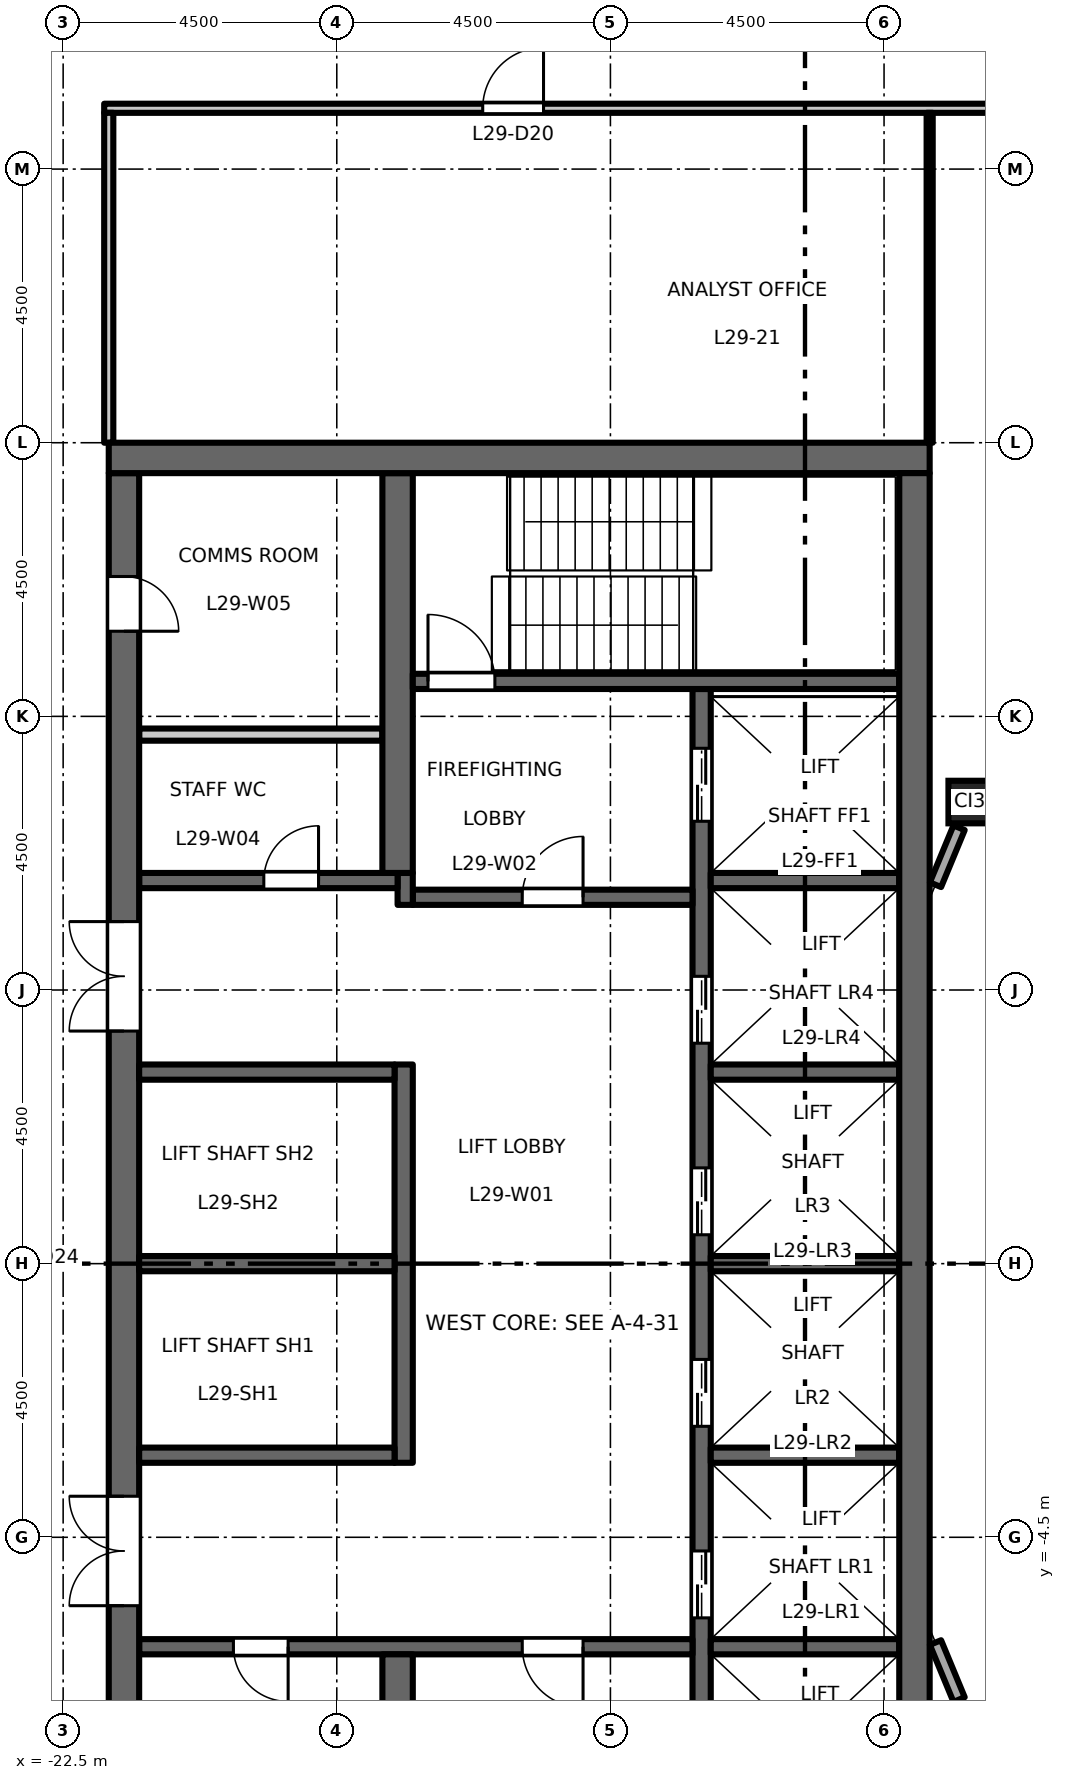
"""IFC4 building model, lengths in metres.
Left out: names, types, materials, properties, quantities, classifications, styles, units other than length and angle.
Written with IfcOpenShell. Run it as: python <this file> out.ifc"""

import sys

from ifc_helpers import new_model, si_unit, direction, frame, frame_2d, origin, origin_2d, place, context, subcontext, project, spatial, rectangle, hollow_rectangle, extrude, element, fill, save


model = new_model("IFC4")
c1 = context("Model", 3, precision=1e-05, world=origin(), true_north=direction((0.0, 1.0)))
c2 = subcontext(c1, "Body", "Model", "MODEL_VIEW")
j1 = project(units=[si_unit("LENGTHUNIT", "METRE"), si_unit("PLANEANGLEUNIT", "RADIAN")], contexts=[c1])
p1 = place(None, origin())
s1 = spatial("IfcSite", under=j1, at=p1, CompositionType="ELEMENT")
p2 = place(p1, origin())
s2 = spatial("IfcBuilding", under=s1, at=p2, CompositionType="ELEMENT")
p3 = place(p2, frame((0.0, 0.0, 136.2)))
s3 = spatial("IfcBuildingStorey", under=s2, at=p3, CompositionType="ELEMENT", Elevation=136.2)
p4 = place(p3, frame((-7.591, 7.591, 0.0), z_axis=(0.0, 0.0, 1.0), x_axis=(1.0, 0.0, 0.0)))
e1 = element("IfcColumn", 1, at=p4, inside=s3, PredefinedType="COLUMN", context=c2, shape_type="SweptSolid", body=[
    extrude(hollow_rectangle(XDim=0.7, YDim=0.7, WallThickness=0.04, at=origin_2d()), origin(), (0.0, 0.0, 1.0), 4.5),
])
p5 = place(p3, frame((-12.0, -9.45, 0.0), z_axis=(0.0, 0.0, 1.0), x_axis=(0.0, 1.0, 0.0)))
e2 = element("IfcWall", 2, at=p5, inside=s3, PredefinedType="SHEAR", context=c2, shape_type="SweptSolid", body=[
    extrude(rectangle(XDim=18.9, YDim=0.3, at=frame_2d((9.45, 0.0))), origin(), (0.0, 0.0, 1.0), 4.35),
])
p6 = place(p5, frame((3.625, 0.0, 0.0)))
e3 = element("IfcOpeningElement", 3, at=p6, cuts=e2, PredefinedType="OPENING", context=c2, shape_type="SweptSolid", body=[
    extrude(rectangle(XDim=1.1, YDim=2.1, at=frame_2d((0.55, 1.05))), frame((0.0, 0.16, 0.0), z_axis=(0.0, -1.0, 0.0), x_axis=(1.0, 0.0, 0.0)), (0.0, 0.0, 1.0), 0.32),
])
p7 = place(p5, frame((6.775, 0.0, 0.0)))
e4 = element("IfcOpeningElement", 4, at=p7, cuts=e2, PredefinedType="OPENING", context=c2, shape_type="SweptSolid", body=[
    extrude(rectangle(XDim=1.1, YDim=2.1, at=frame_2d((0.55, 1.05))), frame((0.0, 0.16, 0.0), z_axis=(0.0, -1.0, 0.0), x_axis=(1.0, 0.0, 0.0)), (0.0, 0.0, 1.0), 0.32),
])
p8 = place(p5, frame((9.925, 0.0, 0.0)))
e5 = element("IfcOpeningElement", 5, at=p8, cuts=e2, PredefinedType="OPENING", context=c2, shape_type="SweptSolid", body=[
    extrude(rectangle(XDim=1.1, YDim=2.1, at=frame_2d((0.55, 1.05))), frame((0.0, 0.16, 0.0), z_axis=(0.0, -1.0, 0.0), x_axis=(1.0, 0.0, 0.0)), (0.0, 0.0, 1.0), 0.32),
])
p9 = place(p5, frame((13.075, 0.0, 0.0)))
e6 = element("IfcOpeningElement", 6, at=p9, cuts=e2, PredefinedType="OPENING", context=c2, shape_type="SweptSolid", body=[
    extrude(rectangle(XDim=1.1, YDim=2.1, at=frame_2d((0.55, 1.05))), frame((0.0, 0.16, 0.0), z_axis=(0.0, -1.0, 0.0), x_axis=(1.0, 0.0, 0.0)), (0.0, 0.0, 1.0), 0.32),
])
p10 = place(p5, frame((16.725, 0.0, 0.0)))
e7 = element("IfcOpeningElement", 7, at=p10, cuts=e2, PredefinedType="OPENING", context=c2, shape_type="SweptSolid", body=[
    extrude(rectangle(XDim=1.2, YDim=2.1, at=frame_2d((0.6, 1.05))), frame((0.0, 0.16, 0.0), z_axis=(0.0, -1.0, 0.0), x_axis=(1.0, 0.0, 0.0)), (0.0, 0.0, 1.0), 0.32),
])
p11 = place(p5, frame((0.975, 0.0, 0.0)))
e8 = element("IfcOpeningElement", 8, at=p11, cuts=e2, PredefinedType="OPENING", context=c2, shape_type="SweptSolid", body=[
    extrude(rectangle(XDim=1.2, YDim=2.1, at=frame_2d((0.6, 1.05))), frame((0.0, 0.16, 0.0), z_axis=(0.0, -1.0, 0.0), x_axis=(1.0, 0.0, 0.0)), (0.0, 0.0, 1.0), 0.32),
])
p12 = place(p3, frame((-12.15, 6.025, 0.0), z_axis=(0.0, 0.0, 1.0), x_axis=(-1.0, 0.0, 0.0)))
e9 = element("IfcWall", 9, at=p12, inside=s3, PredefinedType="SHEAR", context=c2, shape_type="SweptSolid", body=[
    extrude(rectangle(XDim=4.6, YDim=0.25, at=frame_2d((2.3, 0.0))), origin(), (0.0, 0.0, 1.0), 4.35),
])
p13 = place(p12, frame((1.8, 0.0, 0.0)))
e10 = element("IfcOpeningElement", 10, at=p13, cuts=e9, PredefinedType="OPENING", context=c2, shape_type="SweptSolid", body=[
    extrude(rectangle(XDim=1.0, YDim=2.1, at=frame_2d((0.5, 1.05))), frame((0.0, 0.135, 0.0), z_axis=(0.0, -1.0, 0.0), x_axis=(1.0, 0.0, 0.0)), (0.0, 0.0, 1.0), 0.27),
])
p14 = place(p3, frame((-16.875, 5.9, 0.0), z_axis=(0.0, 0.0, 1.0), x_axis=(0.0, 1.0, 0.0)))
e11 = element("IfcWall", 11, at=p14, inside=s3, PredefinedType="SHEAR", context=c2, shape_type="SweptSolid", body=[
    extrude(rectangle(XDim=0.525, YDim=0.25, at=frame_2d((0.263, 0.0))), origin(), (0.0, 0.0, 1.0), 4.35),
])
p15 = place(p3, frame((-17.0, 6.3, 0.0), z_axis=(0.0, 0.0, 1.0), x_axis=(-1.0, 0.0, 0.0)))
e12 = element("IfcWall", 12, at=p15, inside=s3, PredefinedType="SHEAR", context=c2, shape_type="SweptSolid", body=[
    extrude(rectangle(XDim=4.25, YDim=0.25, at=frame_2d((2.125, 0.0))), origin(), (0.0, 0.0, 1.0), 4.35),
])
p16 = place(p15, frame((1.3, 0.0, 0.0)))
e13 = element("IfcOpeningElement", 13, at=p16, cuts=e12, PredefinedType="OPENING", context=c2, shape_type="SweptSolid", body=[
    extrude(rectangle(XDim=0.9, YDim=2.1, at=frame_2d((0.45, 1.05))), frame((0.0, 0.135, 0.0), z_axis=(0.0, -1.0, 0.0), x_axis=(1.0, 0.0, 0.0)), (0.0, 0.0, 1.0), 0.27),
])
p17 = place(p3, frame((-12.15, -6.3, 0.0), z_axis=(0.0, 0.0, 1.0), x_axis=(-1.0, 0.0, 0.0)))
e14 = element("IfcWall", 14, at=p17, inside=s3, PredefinedType="SHEAR", context=c2, shape_type="SweptSolid", body=[
    extrude(rectangle(XDim=9.1, YDim=0.25, at=frame_2d((4.55, 0.0))), origin(), (0.0, 0.0, 1.0), 4.35),
])
p18 = place(p17, frame((1.8, 0.0, 0.0)))
e15 = element("IfcOpeningElement", 15, at=p18, cuts=e14, PredefinedType="OPENING", context=c2, shape_type="SweptSolid", body=[
    extrude(rectangle(XDim=1.0, YDim=2.1, at=frame_2d((0.5, 1.05))), frame((0.0, 0.135, 0.0), z_axis=(0.0, -1.0, 0.0), x_axis=(1.0, 0.0, 0.0)), (0.0, 0.0, 1.0), 0.27),
])
p19 = place(p17, frame((6.65, 0.0, 0.0)))
e16 = element("IfcOpeningElement", 16, at=p19, cuts=e14, PredefinedType="OPENING", context=c2, shape_type="SweptSolid", body=[
    extrude(rectangle(XDim=0.9, YDim=2.1, at=frame_2d((0.45, 1.05))), frame((0.0, 0.135, 0.0), z_axis=(0.0, -1.0, 0.0), x_axis=(1.0, 0.0, 0.0)), (0.0, 0.0, 1.0), 0.27),
])
p20 = place(p3, frame((-21.5, -13.0, 0.0), z_axis=(0.0, 0.0, 1.0), x_axis=(0.0, 1.0, 0.0)))
e17 = element("IfcWall", 17, at=p20, inside=s3, PredefinedType="SHEAR", context=c2, shape_type="SweptSolid", body=[
    extrude(rectangle(XDim=26.0, YDim=0.5, at=frame_2d((13.0, 0.0))), origin(), (0.0, 0.0, 1.0), 4.35),
])
p21 = place(p20, frame((16.825, 0.0, 0.0)))
e18 = element("IfcOpeningElement", 18, at=p21, cuts=e17, PredefinedType="OPENING", context=c2, shape_type="SweptSolid", body=[
    extrude(rectangle(XDim=1.8, YDim=2.1, at=frame_2d((0.9, 1.05))), frame((0.0, 0.26, 0.0), z_axis=(0.0, -1.0, 0.0), x_axis=(1.0, 0.0, 0.0)), (0.0, 0.0, 1.0), 0.52),
])
p22 = place(p20, frame((7.375, 0.0, 0.0)))
e19 = element("IfcOpeningElement", 19, at=p22, cuts=e17, PredefinedType="OPENING", context=c2, shape_type="SweptSolid", body=[
    extrude(rectangle(XDim=1.8, YDim=2.1, at=frame_2d((0.9, 1.05))), frame((0.0, 0.26, 0.0), z_axis=(0.0, -1.0, 0.0), x_axis=(1.0, 0.0, 0.0)), (0.0, 0.0, 1.0), 0.52),
])
p23 = place(p20, frame((23.4, 0.0, 0.0)))
e20 = element("IfcOpeningElement", 20, at=p23, cuts=e17, PredefinedType="OPENING", context=c2, shape_type="SweptSolid", body=[
    extrude(rectangle(XDim=0.9, YDim=2.1, at=frame_2d((0.45, 1.05))), frame((0.0, 0.26, 0.0), z_axis=(0.0, -1.0, 0.0), x_axis=(1.0, 0.0, 0.0)), (0.0, 0.0, 1.0), 0.52),
])
p24 = place(p3, frame((-17.25, 8.7, 0.0), z_axis=(0.0, 0.0, 1.0), x_axis=(-1.0, 0.0, 0.0)))
e21 = element("IfcWall", 21, at=p24, inside=s3, PredefinedType="PARTITIONING", context=c2, shape_type="SweptSolid", body=[
    extrude(rectangle(XDim=4.0, YDim=0.2, at=frame_2d((2.0, 0.0))), origin(), (0.0, 0.0, 1.0), 4.35),
])
p25 = place(p3, frame((-16.9, -3.275, 0.0), z_axis=(0.0, 0.0, 1.0), x_axis=(0.0, 1.0, 0.0)))
e22 = element("IfcWall", 22, at=p25, inside=s3, PredefinedType="SHEAR", context=c2, shape_type="SweptSolid", body=[
    extrude(rectangle(XDim=6.55, YDim=0.3, at=frame_2d((3.275, 0.0))), origin(), (0.0, 0.0, 1.0), 4.35),
])
for number, where, z_axis, x_axis in (
    (23, (-17.05, 0.0, 0.0), (0.0, 0.0, 1.0), (-1.0, 0.0, 0.0)),
    (24, (-17.05, 3.15, 0.0), (0.0, 0.0, 1.0), (-1.0, 0.0, 0.0)),
    (25, (-17.05, -3.15, 0.0), (0.0, 0.0, 1.0), (-1.0, 0.0, 0.0)),
):
    element("IfcWall", number, at=place(p3, frame(where, z_axis=z_axis, x_axis=x_axis)), inside=s3, PredefinedType="SHEAR", context=c2, shape_type="SweptSolid", body=[
        extrude(rectangle(XDim=4.2, YDim=0.25, at=frame_2d((2.1, 0.0))), origin(), (0.0, 0.0, 1.0), 4.35),
    ])
for number, where, z_axis, x_axis in (
    (26, (-17.0, 6.425, 0.0), (0.0, 0.0, 1.0), (0.0, 1.0, 0.0)),
    (27, (-17.0, -13.0, 0.0), (0.0, 0.0, 1.0), (0.0, 1.0, 0.0)),
):
    element("IfcWall", number, at=place(p3, frame(where, z_axis=z_axis, x_axis=x_axis)), inside=s3, PredefinedType="SHEAR", context=c2, shape_type="SweptSolid", body=[
        extrude(rectangle(XDim=6.575, YDim=0.5, at=frame_2d((3.288, 0.0))), origin(), (0.0, 0.0, 1.0), 4.35),
    ])
for number, where, z_axis, x_axis in (
    (28, (-8.75, 0.0, 0.0), (0.0, 0.0, 1.0), (-1.0, 0.0, 0.0)),
    (29, (-8.75, 3.15, 0.0), (0.0, 0.0, 1.0), (-1.0, 0.0, 0.0)),
    (30, (-8.75, 6.3, 0.0), (0.0, 0.0, 1.0), (-1.0, 0.0, 0.0)),
    (31, (-8.75, -3.15, 0.0), (0.0, 0.0, 1.0), (-1.0, 0.0, 0.0)),
    (32, (-8.75, -6.3, 0.0), (0.0, 0.0, 1.0), (-1.0, 0.0, 0.0)),
):
    element("IfcWall", number, at=place(p3, frame(where, z_axis=z_axis, x_axis=x_axis)), inside=s3, PredefinedType="SHEAR", context=c2, shape_type="SweptSolid", body=[
        extrude(rectangle(XDim=3.1, YDim=0.25, at=frame_2d((1.55, 0.0))), origin(), (0.0, 0.0, 1.0), 4.35),
    ])
p26 = place(p3, frame((-8.75, 9.575, 0.0), z_axis=(0.0, 0.0, 1.0), x_axis=(-1.0, 0.0, 0.0)))
e33 = element("IfcWall", 33, at=p26, inside=s3, PredefinedType="SHEAR", context=c2, shape_type="SweptSolid", body=[
    extrude(rectangle(XDim=8.0, YDim=0.25, at=frame_2d((4.0, 0.0))), origin(), (0.0, 0.0, 1.0), 4.35),
])
p27 = place(p26, frame((6.65, 0.0, 0.0)))
e34 = element("IfcOpeningElement", 34, at=p27, cuts=e33, PredefinedType="OPENING", context=c2, shape_type="SweptSolid", body=[
    extrude(rectangle(XDim=1.1, YDim=2.1, at=frame_2d((0.55, 1.05))), frame((0.0, 0.135, 0.0), z_axis=(0.0, -1.0, 0.0), x_axis=(1.0, 0.0, 0.0)), (0.0, 0.0, 1.0), 0.27),
])
p28 = place(p3, frame((-8.25, 13.25, 0.0), z_axis=(0.0, 0.0, 1.0), x_axis=(-1.0, 0.0, 0.0)))
e35 = element("IfcWall", 35, at=p28, inside=s3, PredefinedType="SHEAR", context=c2, shape_type="SweptSolid", body=[
    extrude(rectangle(XDim=13.5, YDim=0.5, at=frame_2d((6.75, 0.0))), origin(), (0.0, 0.0, 1.0), 4.35),
])
p29 = place(p3, frame((-8.5, -13.0, 0.0), z_axis=(0.0, 0.0, 1.0), x_axis=(0.0, 1.0, 0.0)))
e36 = element("IfcWall", 36, at=p29, inside=s3, PredefinedType="SHEAR", context=c2, shape_type="SweptSolid", body=[
    extrude(rectangle(XDim=26.0, YDim=0.5, at=frame_2d((13.0, 0.0))), origin(), (0.0, 0.0, 1.0), 4.35),
])
for number, where, z_axis, x_axis in (
    (37, (-7.766, 7.168, 0.0), (0.0, 0.0, 1.0), (-0.383, -0.924, 0.0)),
    (38, (-8.154, -6.231, 0.0), (0.0, 0.0, 1.0), (0.383, -0.924, 0.0)),
):
    element("IfcWall", number, at=place(p3, frame(where, z_axis=z_axis, x_axis=x_axis)), inside=s3, PredefinedType="STANDARD", context=c2, shape_type="SweptSolid", body=[
        extrude(rectangle(XDim=1.015, YDim=0.2, at=frame_2d((0.507, 0.0))), origin(), (0.0, 0.0, 1.0), 3.826),
    ])
p30 = place(p3, frame((-21.825, 19.0, 0.0), z_axis=(0.0, 0.0, 1.0), x_axis=(1.0, 0.0, 0.0)))
e39 = element("IfcWall", 39, at=p30, inside=s3, PredefinedType="PARTITIONING", context=c2, shape_type="SweptSolid", body=[
    extrude(rectangle(XDim=43.65, YDim=0.15, at=frame_2d((21.825, 0.0))), origin(), (0.0, 0.0, 1.0), 4.35),
])
p31 = place(p30, frame((17.225, 0.0, 0.0)))
e40 = element("IfcOpeningElement", 40, at=p31, cuts=e39, PredefinedType="OPENING", context=c2, shape_type="SweptSolid", body=[
    extrude(rectangle(XDim=1.0, YDim=2.1, at=frame_2d((0.5, 1.05))), frame((0.0, 0.085, 0.0), z_axis=(0.0, -1.0, 0.0), x_axis=(1.0, 0.0, 0.0)), (0.0, 0.0, 1.0), 0.17),
])
p32 = place(p30, frame((25.475, 0.0, 0.0)))
e41 = element("IfcOpeningElement", 41, at=p32, cuts=e39, PredefinedType="OPENING", context=c2, shape_type="SweptSolid", body=[
    extrude(rectangle(XDim=1.0, YDim=2.1, at=frame_2d((0.5, 1.05))), frame((0.0, 0.085, 0.0), z_axis=(0.0, -1.0, 0.0), x_axis=(1.0, 0.0, 0.0)), (0.0, 0.0, 1.0), 0.17),
])
p33 = place(p30, frame((6.225, 0.0, 0.0)))
e42 = element("IfcOpeningElement", 42, at=p33, cuts=e39, PredefinedType="OPENING", context=c2, shape_type="SweptSolid", body=[
    extrude(rectangle(XDim=1.0, YDim=2.1, at=frame_2d((0.5, 1.05))), frame((0.0, 0.085, 0.0), z_axis=(0.0, -1.0, 0.0), x_axis=(1.0, 0.0, 0.0)), (0.0, 0.0, 1.0), 0.17),
])
p34 = place(p30, frame((36.225, 0.0, 0.0)))
e43 = element("IfcOpeningElement", 43, at=p34, cuts=e39, PredefinedType="OPENING", context=c2, shape_type="SweptSolid", body=[
    extrude(rectangle(XDim=1.0, YDim=2.1, at=frame_2d((0.5, 1.05))), frame((0.0, 0.085, 0.0), z_axis=(0.0, -1.0, 0.0), x_axis=(1.0, 0.0, 0.0)), (0.0, 0.0, 1.0), 0.17),
])
p35 = place(p3, frame((-21.75, 13.5, 0.0), z_axis=(0.0, 0.0, 1.0), x_axis=(0.0, 1.0, 0.0)))
e44 = element("IfcWall", 44, at=p35, inside=s3, PredefinedType="PARTITIONING", context=c2, shape_type="SweptSolid", body=[
    extrude(rectangle(XDim=5.425, YDim=0.15, at=frame_2d((2.712, 0.0))), origin(), (0.0, 0.0, 1.0), 4.35),
])
p36 = place(p3, frame((-8.25, 13.5, 0.0), z_axis=(0.0, 0.0, 1.0), x_axis=(0.0, 1.0, 0.0)))
e45 = element("IfcWall", 45, at=p36, inside=s3, PredefinedType="PARTITIONING", context=c2, shape_type="SweptSolid", body=[
    extrude(rectangle(XDim=5.425, YDim=0.1, at=frame_2d((2.712, 0.0))), origin(), (0.0, 0.0, 1.0), 4.35),
])
p37 = place(p13, origin())
e46 = element("IfcDoor", 46, at=p37, inside=s3, OperationType="SINGLE_SWING_LEFT", PredefinedType="DOOR", context=c2, shape_type="SweptSolid", body=[
    extrude(rectangle(XDim=1.0, YDim=2.1, at=frame_2d((0.5, 1.05))), frame((0.0, 0.025, 0.0), z_axis=(0.0, -1.0, 0.0), x_axis=(1.0, 0.0, 0.0)), (0.0, 0.0, 1.0), 0.05),
])
fill(e10, e46)
p38 = place(p18, origin())
e47 = element("IfcDoor", 47, at=p38, inside=s3, OperationType="SINGLE_SWING_RIGHT", PredefinedType="DOOR", context=c2, shape_type="SweptSolid", body=[
    extrude(rectangle(XDim=1.0, YDim=2.1, at=frame_2d((0.5, 1.05))), frame((0.0, 0.025, 0.0), z_axis=(0.0, -1.0, 0.0), x_axis=(1.0, 0.0, 0.0)), (0.0, 0.0, 1.0), 0.05),
])
fill(e15, e47)
p39 = place(p27, origin())
e48 = element("IfcDoor", 48, at=p39, inside=s3, OperationType="SINGLE_SWING_RIGHT", PredefinedType="DOOR", context=c2, shape_type="SweptSolid", body=[
    extrude(rectangle(XDim=1.1, YDim=2.1, at=frame_2d((0.55, 1.05))), frame((0.0, 0.025, 0.0), z_axis=(0.0, -1.0, 0.0), x_axis=(1.0, 0.0, 0.0)), (0.0, 0.0, 1.0), 0.05),
])
fill(e34, e48)
p40 = place(p21, origin())
e49 = element("IfcDoor", 49, at=p40, inside=s3, OperationType="DOUBLE_DOOR_DOUBLE_SWING", PredefinedType="DOOR", context=c2, shape_type="SweptSolid", body=[
    extrude(rectangle(XDim=1.8, YDim=2.1, at=frame_2d((0.9, 1.05))), frame((0.0, 0.025, 0.0), z_axis=(0.0, -1.0, 0.0), x_axis=(1.0, 0.0, 0.0)), (0.0, 0.0, 1.0), 0.05),
])
fill(e18, e49)
p41 = place(p22, origin())
e50 = element("IfcDoor", 50, at=p41, inside=s3, OperationType="DOUBLE_DOOR_DOUBLE_SWING", PredefinedType="DOOR", context=c2, shape_type="SweptSolid", body=[
    extrude(rectangle(XDim=1.8, YDim=2.1, at=frame_2d((0.9, 1.05))), frame((0.0, 0.025, 0.0), z_axis=(0.0, -1.0, 0.0), x_axis=(1.0, 0.0, 0.0)), (0.0, 0.0, 1.0), 0.05),
])
fill(e19, e50)
p42 = place(p6, origin())
e51 = element("IfcDoor", 51, at=p42, inside=s3, OperationType="DOUBLE_DOOR_SLIDING", PredefinedType="DOOR", context=c2, shape_type="SweptSolid", body=[
    extrude(rectangle(XDim=1.1, YDim=2.1, at=frame_2d((0.55, 1.05))), frame((0.0, 0.025, 0.0), z_axis=(0.0, -1.0, 0.0), x_axis=(1.0, 0.0, 0.0)), (0.0, 0.0, 1.0), 0.05),
])
fill(e3, e51)
p43 = place(p7, origin())
e52 = element("IfcDoor", 52, at=p43, inside=s3, OperationType="DOUBLE_DOOR_SLIDING", PredefinedType="DOOR", context=c2, shape_type="SweptSolid", body=[
    extrude(rectangle(XDim=1.1, YDim=2.1, at=frame_2d((0.55, 1.05))), frame((0.0, 0.025, 0.0), z_axis=(0.0, -1.0, 0.0), x_axis=(1.0, 0.0, 0.0)), (0.0, 0.0, 1.0), 0.05),
])
fill(e4, e52)
p44 = place(p8, origin())
e53 = element("IfcDoor", 53, at=p44, inside=s3, OperationType="DOUBLE_DOOR_SLIDING", PredefinedType="DOOR", context=c2, shape_type="SweptSolid", body=[
    extrude(rectangle(XDim=1.1, YDim=2.1, at=frame_2d((0.55, 1.05))), frame((0.0, 0.025, 0.0), z_axis=(0.0, -1.0, 0.0), x_axis=(1.0, 0.0, 0.0)), (0.0, 0.0, 1.0), 0.05),
])
fill(e5, e53)
p45 = place(p9, origin())
e54 = element("IfcDoor", 54, at=p45, inside=s3, OperationType="DOUBLE_DOOR_SLIDING", PredefinedType="DOOR", context=c2, shape_type="SweptSolid", body=[
    extrude(rectangle(XDim=1.1, YDim=2.1, at=frame_2d((0.55, 1.05))), frame((0.0, 0.025, 0.0), z_axis=(0.0, -1.0, 0.0), x_axis=(1.0, 0.0, 0.0)), (0.0, 0.0, 1.0), 0.05),
])
fill(e6, e54)
p46 = place(p10, origin())
e55 = element("IfcDoor", 55, at=p46, inside=s3, OperationType="DOUBLE_DOOR_SLIDING", PredefinedType="DOOR", context=c2, shape_type="SweptSolid", body=[
    extrude(rectangle(XDim=1.2, YDim=2.1, at=frame_2d((0.6, 1.05))), frame((0.0, 0.025, 0.0), z_axis=(0.0, -1.0, 0.0), x_axis=(1.0, 0.0, 0.0)), (0.0, 0.0, 1.0), 0.05),
])
fill(e7, e55)
p47 = place(p16, origin())
e56 = element("IfcDoor", 56, at=p47, inside=s3, OperationType="SINGLE_SWING_LEFT", PredefinedType="DOOR", context=c2, shape_type="SweptSolid", body=[
    extrude(rectangle(XDim=0.9, YDim=2.1, at=frame_2d((0.45, 1.05))), frame((0.0, 0.025, 0.0), z_axis=(0.0, -1.0, 0.0), x_axis=(1.0, 0.0, 0.0)), (0.0, 0.0, 1.0), 0.05),
])
fill(e13, e56)
p48 = place(p23, origin())
e57 = element("IfcDoor", 57, at=p48, inside=s3, OperationType="SINGLE_SWING_LEFT", PredefinedType="DOOR", context=c2, shape_type="SweptSolid", body=[
    extrude(rectangle(XDim=0.9, YDim=2.1, at=frame_2d((0.45, 1.05))), frame((0.0, 0.025, 0.0), z_axis=(0.0, -1.0, 0.0), x_axis=(1.0, 0.0, 0.0)), (0.0, 0.0, 1.0), 0.05),
])
fill(e20, e57)
p49 = place(p19, origin())
e58 = element("IfcDoor", 58, at=p49, inside=s3, OperationType="SINGLE_SWING_RIGHT", PredefinedType="DOOR", context=c2, shape_type="SweptSolid", body=[
    extrude(rectangle(XDim=0.9, YDim=2.1, at=frame_2d((0.45, 1.05))), frame((0.0, 0.025, 0.0), z_axis=(0.0, -1.0, 0.0), x_axis=(1.0, 0.0, 0.0)), (0.0, 0.0, 1.0), 0.05),
])
fill(e16, e58)
p50 = place(p33, origin())
e59 = element("IfcDoor", 59, at=p50, inside=s3, OperationType="SINGLE_SWING_RIGHT", PredefinedType="DOOR", context=c2, shape_type="SweptSolid", body=[
    extrude(rectangle(XDim=1.0, YDim=2.1, at=frame_2d((0.5, 1.05))), frame((0.0, 0.025, 0.0), z_axis=(0.0, -1.0, 0.0), x_axis=(1.0, 0.0, 0.0)), (0.0, 0.0, 1.0), 0.05),
])
fill(e42, e59)
save(model, sys.argv[1])
